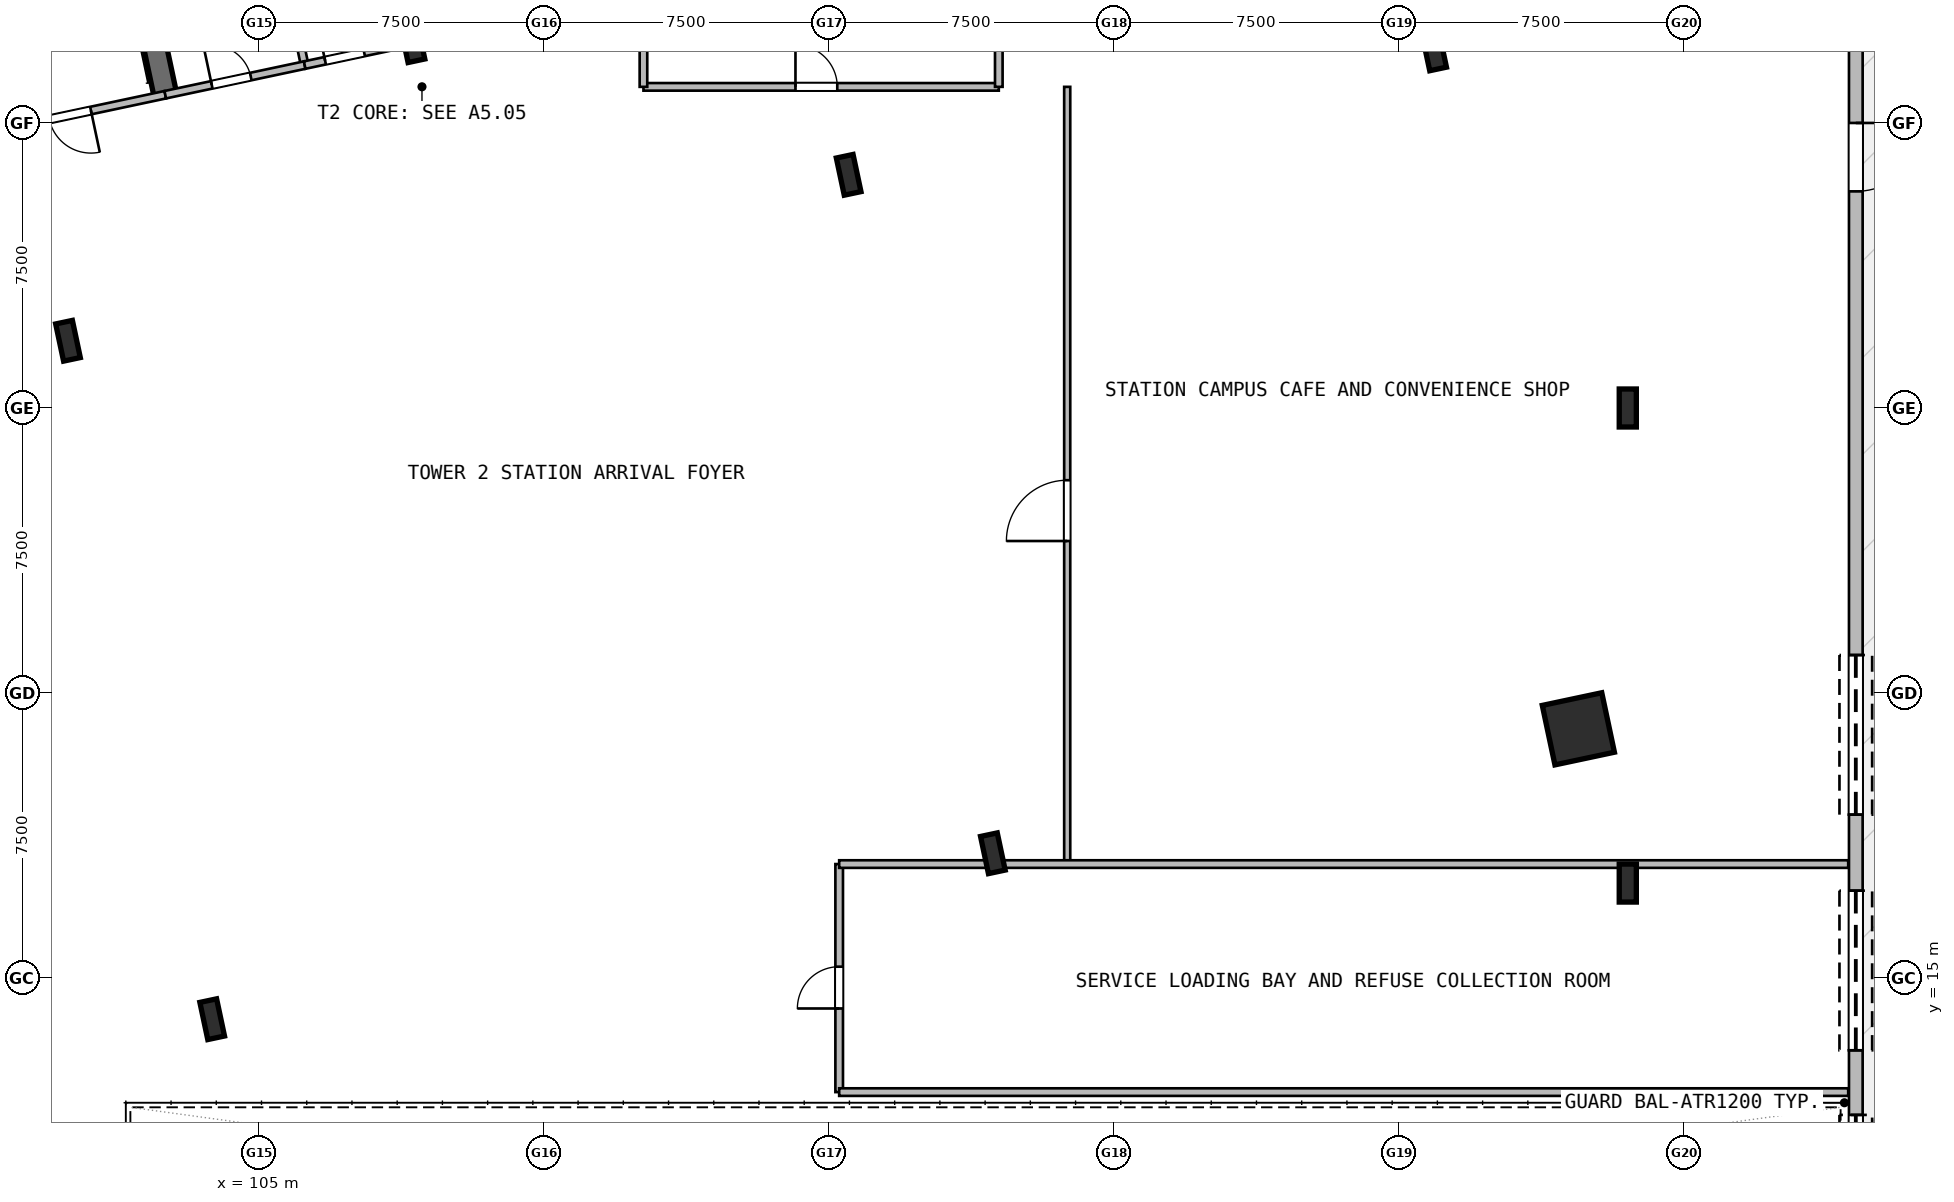
"""IFC4 building model, lengths in metres.
Left out: names, types, materials, properties, quantities, classifications, styles, units other than length and angle.
Written with IfcOpenShell. Run it as: python <this file> out.ifc"""

import sys

from ifc_helpers import new_model, si_unit, direction, frame, frame_2d, origin, origin_2d, place, context, subcontext, project, spatial, rectangle, hollow_rectangle, i_section, extrude, element, fill, save


model = new_model("IFC4")
c1 = context("Model", 3, precision=1e-05, world=origin(), true_north=direction((0.0, 1.0)))
c2 = subcontext(c1, "Body", "Model", "MODEL_VIEW")
j1 = project(units=[si_unit("LENGTHUNIT", "METRE"), si_unit("PLANEANGLEUNIT", "RADIAN")], contexts=[c1])
p1 = place(None, origin())
s1 = spatial("IfcSite", under=j1, at=p1, CompositionType="ELEMENT")
p2 = place(p1, origin())
s2 = spatial("IfcBuilding", under=s1, at=p2, CompositionType="ELEMENT")
p3 = place(p2, origin())
s3 = spatial("IfcBuildingStorey", under=s2, at=p3, CompositionType="ELEMENT", Elevation=0.0)
p4 = place(p3, frame((102.518, 38.243, 0.0), z_axis=(0.0, 0.0, 1.0), x_axis=(-0.207927495108, 0.978144241295, 0.0)))
e1 = element("IfcWall", 1, at=p4, inside=s3, PredefinedType="SHEAR", context=c2, shape_type="SweptSolid", body=[
    extrude(rectangle(XDim=9.6, YDim=0.6, at=frame_2d((4.8, 0.0))), origin(), (0.0, 0.0, 1.0), 6.0),
])
for number, where, z_axis, x_axis in (
    (2, (103.753, 13.918, 0.0), (0.0, 0.0, 1.0), (0.978, 0.208, 0.0)),
    (3, (99.958, 31.769, 0.0), (0.0, 0.0, 1.0), (0.978, 0.208, 0.0)),
    (4, (109.023, 39.625, 0.0), (0.0, 0.0, 1.0), (0.978, 0.208, 0.0)),
    (5, (124.294, 18.284, 0.0), (0.0, 0.0, 1.0), (0.978, 0.208, 0.0)),
    (6, (120.499, 36.135, 0.0), (0.0, 0.0, 1.0), (0.978, 0.208, 0.0)),
):
    element("IfcColumn", number, at=place(p3, frame(where, z_axis=z_axis, x_axis=x_axis)), inside=s3, PredefinedType="COLUMN", context=c2, shape_type="SweptSolid", body=[
        extrude(i_section(OverallWidth=0.45, OverallDepth=1.0, WebThickness=0.022, FlangeThickness=0.04, at=origin_2d()), origin(), (0.0, 0.0, 1.0), 6.0),
    ])
p5 = place(p3, frame((139.699, 21.559, 0.0), z_axis=(0.0, 0.0, 1.0), x_axis=(0.978147600734, 0.207911690818, 0.0)))
e7 = element("IfcColumn", 7, at=p5, inside=s3, PredefinedType="COLUMN", context=c2, shape_type="SweptSolid", body=[
    extrude(hollow_rectangle(XDim=1.6, YDim=1.6, WallThickness=0.04, at=origin_2d()), origin(), (0.0, 0.0, 1.0), 6.0),
])
for number, where, z_axis, x_axis in (
    (8, (135.905, 39.41, 0.0), (0.0, 0.0, 1.0), (0.978, 0.208, 0.0)),
    (9, (141.0, 17.5, 0.0), (0.0, 0.0, 1.0), (1.0, 0.0, 0.0)),
    (10, (141.0, 30.0, 0.0), (0.0, 0.0, 1.0), (1.0, 0.0, 0.0)),
):
    element("IfcColumn", number, at=place(p3, frame(where, z_axis=z_axis, x_axis=x_axis)), inside=s3, PredefinedType="COLUMN", context=c2, shape_type="SweptSolid", body=[
        extrude(i_section(OverallWidth=0.45, OverallDepth=1.0, WebThickness=0.022, FlangeThickness=0.04, at=origin_2d()), origin(), (0.0, 0.0, 1.0), 6.0),
    ])
p6 = place(p3, frame((147.0, 55.5, 0.0), z_axis=(0.0, 0.0, 1.0), x_axis=(0.0, -1.0, 0.0)))
e11 = element("IfcWall", 11, at=p6, inside=s3, PredefinedType="SOLIDWALL", context=c2, shape_type="SweptSolid", body=[
    extrude(rectangle(XDim=51.0, YDim=0.36, at=frame_2d((25.5, 0.0))), origin(), (0.0, 0.0, 1.0), 5.68),
])
p7 = place(p6, frame((18.0, 0.0, 0.0)))
e12 = element("IfcOpeningElement", 12, at=p7, cuts=e11, PredefinedType="OPENING", context=c2, shape_type="SweptSolid", body=[
    extrude(rectangle(XDim=1.8, YDim=2.3, at=frame_2d((0.9, 1.15))), frame((0.0, 0.19, 0.0), z_axis=(0.0, -1.0, 0.0), x_axis=(1.0, 0.0, 0.0)), (0.0, 0.0, 1.0), 0.38),
])
p8 = place(p6, frame((44.1, 0.0, 0.0)))
e13 = element("IfcOpeningElement", 13, at=p8, cuts=e11, PredefinedType="OPENING", context=c2, shape_type="SweptSolid", body=[
    extrude(rectangle(XDim=5.8, YDim=3.4, at=frame_2d((2.9, 1.7))), frame((0.0, 0.19, 0.0), z_axis=(0.0, -1.0, 0.0), x_axis=(1.0, 0.0, 0.0)), (0.0, 0.0, 1.0), 0.38),
])
p9 = place(p6, frame((38.2, 0.0, 0.0)))
e14 = element("IfcOpeningElement", 14, at=p9, cuts=e11, PredefinedType="OPENING", context=c2, shape_type="SweptSolid", body=[
    extrude(rectangle(XDim=4.2, YDim=3.6, at=frame_2d((2.1, 1.8))), frame((0.0, 0.19, 0.0), z_axis=(0.0, -1.0, 0.0), x_axis=(1.0, 0.0, 0.0)), (0.0, 0.0, 1.0), 0.38),
])
p10 = place(p6, frame((32.0, 0.0, 0.0)))
e15 = element("IfcOpeningElement", 15, at=p10, cuts=e11, PredefinedType="OPENING", context=c2, shape_type="SweptSolid", body=[
    extrude(rectangle(XDim=4.2, YDim=3.6, at=frame_2d((2.1, 1.8))), frame((0.0, 0.19, 0.0), z_axis=(0.0, -1.0, 0.0), x_axis=(1.0, 0.0, 0.0)), (0.0, 0.0, 1.0), 0.38),
])
p11 = place(p3, frame((102.518, 38.243, 0.0), z_axis=(0.0, 0.0, 1.0), x_axis=(-0.978143537786, -0.207930804564, 0.0)))
e16 = element("IfcWall", 16, at=p11, inside=s3, PredefinedType="PARTITIONING", context=c2, shape_type="SweptSolid", body=[
    extrude(rectangle(XDim=3.85, YDim=0.2, at=frame_2d((1.925, 0.0))), origin(), (0.0, 0.0, 1.0), 4.88),
])
p12 = place(p11, frame((2.0, 0.0, 0.0)))
e17 = element("IfcOpeningElement", 17, at=p12, cuts=e16, PredefinedType="OPENING", context=c2, shape_type="SweptSolid", body=[
    extrude(rectangle(XDim=1.12, YDim=2.1, at=frame_2d((0.56, 1.05))), frame((0.0, 0.11, 0.0), z_axis=(0.0, -1.0, 0.0), x_axis=(1.0, 0.0, 0.0)), (0.0, 0.0, 1.0), 0.22),
])
p13 = place(p3, frame((106.186, 39.022, 0.0), z_axis=(0.0, 0.0, 1.0), x_axis=(-0.207916691923, 0.978146537703, 0.0)))
e18 = element("IfcWall", 18, at=p13, inside=s3, PredefinedType="PARTITIONING", context=c2, shape_type="SweptSolid", body=[
    extrude(rectangle(XDim=6.35, YDim=0.2, at=frame_2d((3.175, 0.0))), origin(), (0.0, 0.0, 1.0), 5.68),
])
p14 = place(p13, frame((2.8, 0.0, 0.0)))
e19 = element("IfcOpeningElement", 19, at=p14, cuts=e18, PredefinedType="OPENING", context=c2, shape_type="SweptSolid", body=[
    extrude(rectangle(XDim=1.05, YDim=2.1, at=frame_2d((0.525, 1.05))), frame((0.0, 0.11, 0.0), z_axis=(0.0, -1.0, 0.0), x_axis=(1.0, 0.0, 0.0)), (0.0, 0.0, 1.0), 0.22),
])
p15 = place(p3, frame((102.518, 38.243, 0.0), z_axis=(0.0, 0.0, 1.0), x_axis=(0.978153555683, 0.20788367301, 0.0)))
e20 = element("IfcWall", 20, at=p15, inside=s3, PredefinedType="PARTITIONING", context=c2, shape_type="SweptSolid", body=[
    extrude(rectangle(XDim=3.75, YDim=0.2, at=frame_2d((1.875, 0.0))), origin(), (0.0, 0.0, 1.0), 4.88),
])
p16 = place(p15, frame((1.25, 0.0, 0.0)))
e21 = element("IfcOpeningElement", 21, at=p16, cuts=e20, PredefinedType="OPENING", context=c2, shape_type="SweptSolid", body=[
    extrude(rectangle(XDim=1.05, YDim=2.1, at=frame_2d((0.525, 1.05))), frame((0.0, 0.11, 0.0), z_axis=(0.0, -1.0, 0.0), x_axis=(1.0, 0.0, 0.0)), (0.0, 0.0, 1.0), 0.22),
])
p17 = place(p3, frame((106.186, 39.022, 0.0), z_axis=(0.0, 0.0, 1.0), x_axis=(0.978145519981, 0.20792147975, 0.0)))
e22 = element("IfcWall", 22, at=p17, inside=s3, PredefinedType="PARTITIONING", context=c2, shape_type="SweptSolid", body=[
    extrude(rectangle(XDim=9.45, YDim=0.2, at=frame_2d((4.725, 0.0))), origin(), (0.0, 0.0, 1.0), 4.88),
])
p18 = place(p17, frame((0.55, 0.0, 0.0)))
e23 = element("IfcOpeningElement", 23, at=p18, cuts=e22, PredefinedType="OPENING", context=c2, shape_type="SweptSolid", body=[
    extrude(rectangle(XDim=1.05, YDim=2.1, at=frame_2d((0.525, 1.05))), frame((0.0, 0.11, 0.0), z_axis=(0.0, -1.0, 0.0), x_axis=(1.0, 0.0, 0.0)), (0.0, 0.0, 1.0), 0.22),
])
p19 = place(p3, frame((115.1, 38.45, 0.0), z_axis=(0.0, 0.0, 1.0), x_axis=(1.0, 0.0, 0.0)))
e24 = element("IfcWall", 24, at=p19, inside=s3, PredefinedType="PARTITIONING", context=c2, shape_type="SweptSolid", body=[
    extrude(rectangle(XDim=9.35, YDim=0.2, at=frame_2d((4.675, 0.0))), origin(), (0.0, 0.0, 1.0), 5.23),
])
p20 = place(p19, frame((4.0, 0.0, 0.0)))
e25 = element("IfcOpeningElement", 25, at=p20, cuts=e24, PredefinedType="OPENING", context=c2, shape_type="SweptSolid", body=[
    extrude(rectangle(XDim=1.1, YDim=2.15, at=frame_2d((0.55, 1.075))), frame((0.0, 0.11, 0.0), z_axis=(0.0, -1.0, 0.0), x_axis=(1.0, 0.0, 0.0)), (0.0, 0.0, 1.0), 0.22),
])
p21 = place(p3, frame((115.1, 38.45, 0.0), z_axis=(0.0, 0.0, 1.0), x_axis=(0.0, 1.0, 0.0)))
e26 = element("IfcWall", 26, at=p21, inside=s3, PredefinedType="PARTITIONING", context=c2, shape_type="SweptSolid", body=[
    extrude(rectangle(XDim=2.65, YDim=0.2, at=frame_2d((1.325, 0.0))), origin(), (0.0, 0.0, 1.0), 5.68),
])
p22 = place(p3, frame((124.45, 38.45, 0.0), z_axis=(0.0, 0.0, 1.0), x_axis=(0.0, 1.0, 0.0)))
e27 = element("IfcWall", 27, at=p22, inside=s3, PredefinedType="PARTITIONING", context=c2, shape_type="SweptSolid", body=[
    extrude(rectangle(XDim=16.85, YDim=0.2, at=frame_2d((8.425, 0.0))), origin(), (0.0, 0.0, 1.0), 5.68),
])
p23 = place(p3, frame((126.25, 18.0, 0.0), z_axis=(0.0, 0.0, 1.0), x_axis=(0.0, 1.0, 0.0)))
e28 = element("IfcWall", 28, at=p23, inside=s3, PredefinedType="PARTITIONING", context=c2, shape_type="SweptSolid", body=[
    extrude(rectangle(XDim=20.45, YDim=0.16, at=frame_2d((10.225, 0.0))), origin(), (0.0, 0.0, 1.0), 5.68),
])
p24 = place(p23, frame((8.5, 0.0, 0.0)))
e29 = element("IfcOpeningElement", 29, at=p24, cuts=e28, PredefinedType="OPENING", context=c2, shape_type="SweptSolid", body=[
    extrude(rectangle(XDim=1.6, YDim=2.2, at=frame_2d((0.8, 1.1))), frame((0.0, 0.09, 0.0), z_axis=(0.0, -1.0, 0.0), x_axis=(1.0, 0.0, 0.0)), (0.0, 0.0, 1.0), 0.18),
])
p25 = place(p3, frame((120.25, 12.0, 0.0), z_axis=(0.0, 0.0, 1.0), x_axis=(0.0, 1.0, 0.0)))
e30 = element("IfcWall", 30, at=p25, inside=s3, PredefinedType="PARTITIONING", context=c2, shape_type="SweptSolid", body=[
    extrude(rectangle(XDim=6.0, YDim=0.2, at=frame_2d((3.0, 0.0))), origin(), (0.0, 0.0, 1.0), 5.68),
])
p26 = place(p25, frame((2.2, 0.0, 0.0)))
e31 = element("IfcOpeningElement", 31, at=p26, cuts=e30, PredefinedType="OPENING", context=c2, shape_type="SweptSolid", body=[
    extrude(rectangle(XDim=1.1, YDim=2.15, at=frame_2d((0.55, 1.075))), frame((0.0, 0.11, 0.0), z_axis=(0.0, -1.0, 0.0), x_axis=(1.0, 0.0, 0.0)), (0.0, 0.0, 1.0), 0.22),
])
p27 = place(p3, frame((120.25, 12.0, 0.0), z_axis=(0.0, 0.0, 1.0), x_axis=(1.0, 0.0, 0.0)))
e32 = element("IfcWall", 32, at=p27, inside=s3, PredefinedType="PARTITIONING", context=c2, shape_type="SweptSolid", body=[
    extrude(rectangle(XDim=26.55, YDim=0.2, at=frame_2d((13.275, 0.0))), origin(), (0.0, 0.0, 1.0), 5.68),
])
p28 = place(p3, frame((120.25, 18.0, 0.0), z_axis=(0.0, 0.0, 1.0), x_axis=(1.0, 0.0, 0.0)))
e33 = element("IfcWall", 33, at=p28, inside=s3, PredefinedType="PARTITIONING", context=c2, shape_type="SweptSolid", body=[
    extrude(rectangle(XDim=26.55, YDim=0.2, at=frame_2d((13.275, 0.0))), origin(), (0.0, 0.0, 1.0), 4.78),
])
p29 = place(p7, origin())
e34 = element("IfcDoor", 34, at=p29, inside=s3, OperationType="DOUBLE_DOOR_SINGLE_SWING", PredefinedType="DOOR", context=c2, shape_type="SweptSolid", body=[
    extrude(rectangle(XDim=1.8, YDim=2.3, at=frame_2d((0.9, 1.15))), frame((0.0, 0.025, 0.0), z_axis=(0.0, -1.0, 0.0), x_axis=(1.0, 0.0, 0.0)), (0.0, 0.0, 1.0), 0.05),
])
fill(e12, e34)
p30 = place(p8, origin())
e35 = element("IfcDoor", 35, at=p30, inside=s3, OperationType="ROLLINGUP", PredefinedType="GATE", context=c2, shape_type="SweptSolid", body=[
    extrude(rectangle(XDim=5.8, YDim=3.4, at=frame_2d((2.9, 1.7))), frame((0.0, 0.025, 0.0), z_axis=(0.0, -1.0, 0.0), x_axis=(1.0, 0.0, 0.0)), (0.0, 0.0, 1.0), 0.05),
])
fill(e13, e35)
p31 = place(p9, origin())
e36 = element("IfcDoor", 36, at=p31, inside=s3, OperationType="ROLLINGUP", PredefinedType="GATE", context=c2, shape_type="SweptSolid", body=[
    extrude(rectangle(XDim=4.2, YDim=3.6, at=frame_2d((2.1, 1.8))), frame((0.0, 0.025, 0.0), z_axis=(0.0, -1.0, 0.0), x_axis=(1.0, 0.0, 0.0)), (0.0, 0.0, 1.0), 0.05),
])
fill(e14, e36)
p32 = place(p10, origin())
e37 = element("IfcDoor", 37, at=p32, inside=s3, OperationType="ROLLINGUP", PredefinedType="GATE", context=c2, shape_type="SweptSolid", body=[
    extrude(rectangle(XDim=4.2, YDim=3.6, at=frame_2d((2.1, 1.8))), frame((0.0, 0.025, 0.0), z_axis=(0.0, -1.0, 0.0), x_axis=(1.0, 0.0, 0.0)), (0.0, 0.0, 1.0), 0.05),
])
fill(e15, e37)
p33 = place(p12, origin())
e38 = element("IfcDoor", 38, at=p33, inside=s3, OperationType="SINGLE_SWING_RIGHT", PredefinedType="DOOR", context=c2, shape_type="SweptSolid", body=[
    extrude(rectangle(XDim=1.12, YDim=2.1, at=frame_2d((0.56, 1.05))), frame((0.0, 0.025, 0.0), z_axis=(0.0, -1.0, 0.0), x_axis=(1.0, 0.0, 0.0)), (0.0, 0.0, 1.0), 0.05),
])
fill(e17, e38)
p34 = place(p16, origin())
e39 = element("IfcDoor", 39, at=p34, inside=s3, OperationType="SINGLE_SWING_LEFT", PredefinedType="DOOR", context=c2, shape_type="SweptSolid", body=[
    extrude(rectangle(XDim=1.05, YDim=2.1, at=frame_2d((0.525, 1.05))), frame((0.0, 0.025, 0.0), z_axis=(0.0, -1.0, 0.0), x_axis=(1.0, 0.0, 0.0)), (0.0, 0.0, 1.0), 0.05),
])
fill(e21, e39)
p35 = place(p18, origin())
e40 = element("IfcDoor", 40, at=p35, inside=s3, OperationType="SINGLE_SWING_RIGHT", PredefinedType="DOOR", context=c2, shape_type="SweptSolid", body=[
    extrude(rectangle(XDim=1.05, YDim=2.1, at=frame_2d((0.525, 1.05))), frame((0.0, 0.025, 0.0), z_axis=(0.0, -1.0, 0.0), x_axis=(1.0, 0.0, 0.0)), (0.0, 0.0, 1.0), 0.05),
])
fill(e23, e40)
p36 = place(p20, origin())
e41 = element("IfcDoor", 41, at=p36, inside=s3, OperationType="SINGLE_SWING_RIGHT", PredefinedType="DOOR", context=c2, shape_type="SweptSolid", body=[
    extrude(rectangle(XDim=1.1, YDim=2.15, at=frame_2d((0.55, 1.075))), frame((0.0, 0.025, 0.0), z_axis=(0.0, -1.0, 0.0), x_axis=(1.0, 0.0, 0.0)), (0.0, 0.0, 1.0), 0.05),
])
fill(e25, e41)
p37 = place(p24, origin())
e42 = element("IfcDoor", 42, at=p37, inside=s3, OperationType="DOUBLE_DOOR_SINGLE_SWING", PredefinedType="DOOR", context=c2, shape_type="SweptSolid", body=[
    extrude(rectangle(XDim=1.6, YDim=2.2, at=frame_2d((0.8, 1.1))), frame((0.0, 0.025, 0.0), z_axis=(0.0, -1.0, 0.0), x_axis=(1.0, 0.0, 0.0)), (0.0, 0.0, 1.0), 0.05),
])
fill(e29, e42)
p38 = place(p26, origin())
e43 = element("IfcDoor", 43, at=p38, inside=s3, OperationType="SINGLE_SWING_RIGHT", PredefinedType="DOOR", context=c2, shape_type="SweptSolid", body=[
    extrude(rectangle(XDim=1.1, YDim=2.15, at=frame_2d((0.55, 1.075))), frame((0.0, 0.025, 0.0), z_axis=(0.0, -1.0, 0.0), x_axis=(1.0, 0.0, 0.0)), (0.0, 0.0, 1.0), 0.05),
])
fill(e31, e43)
save(model, sys.argv[1])
